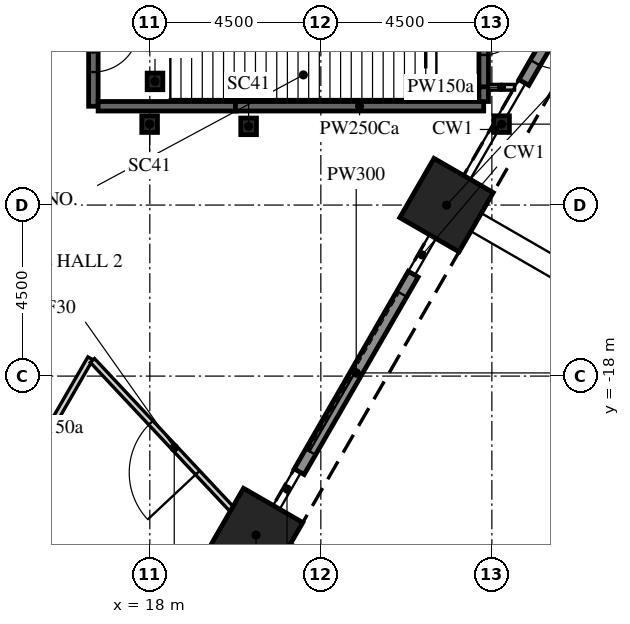
"""IFC4 building model, lengths in metres.
Left out: names, types, materials, properties, quantities, classifications, styles, units other than length and angle.
Written with IfcOpenShell. Run it as: python <this file> out.ifc"""

import sys

from ifc_helpers import new_model, si_unit, direction, frame, frame_2d, origin, origin_2d, place, context, subcontext, project, spatial, polyline, rectangle, i_section, outline, extrude, element, fill, save


model = new_model("IFC4")
c1 = context("Model", 3, precision=1e-05, world=origin(), true_north=direction((0.0, 1.0)))
c2 = subcontext(c1, "Body", "Model", "MODEL_VIEW")
j1 = project(units=[si_unit("LENGTHUNIT", "METRE"), si_unit("PLANEANGLEUNIT", "RADIAN")], contexts=[c1])
p1 = place(None, origin())
s1 = spatial("IfcSite", under=j1, at=p1, CompositionType="ELEMENT")
p2 = place(p1, origin())
s2 = spatial("IfcBuilding", under=s1, at=p2, CompositionType="ELEMENT")
p3 = place(p2, origin())
s3 = spatial("IfcBuildingStorey", under=s2, at=p3, CompositionType="ELEMENT", Elevation=0.0)
for number, where, z_axis, x_axis in (
    (1, (20.795, -22.182, -2.1), (0.0, 0.0, 1.0), (-0.5, -0.866, 0.0)),
    (2, (25.807, -13.501, -2.1), (0.0, 0.0, 1.0), (-0.5, -0.866, 0.0)),
):
    element("IfcColumn", number, at=place(p3, frame(where, z_axis=z_axis, x_axis=x_axis)), inside=s3, PredefinedType="COLUMN", context=c2, shape_type="SweptSolid", body=[
        extrude(rectangle(XDim=1.8, YDim=1.8, at=origin_2d()), origin(), (0.0, 0.0, 1.0), 10.85),
    ])
for number, where, z_axis, x_axis in (
    (3, (27.255, -11.37, -2.1), (0.0, 0.0, 1.0), (1.0, 0.0, 0.0)),
    (4, (20.599, -11.429, -2.1), (0.0, 0.0, 1.0), (1.0, 0.0, 0.0)),
    (5, (18.136, -10.246, -2.1), (0.0, 0.0, 1.0), (1.0, 0.0, 0.0)),
    (6, (17.995, -11.37, -2.1), (0.0, 0.0, 1.0), (1.0, 0.0, 0.0)),
):
    element("IfcColumn", number, at=place(p3, frame(where, z_axis=z_axis, x_axis=x_axis)), inside=s3, PredefinedType="COLUMN", context=c2, shape_type="SweptSolid", body=[
        extrude(i_section(OverallWidth=0.412, OverallDepth=0.437, WebThickness=0.036, FlangeThickness=0.058, FilletRadius=0.015, at=origin_2d()), origin(), (0.0, 0.0, 1.0), 10.85),
    ])
p4 = place(p3, frame((21.931, -20.515, 0.0), z_axis=(0.0, 0.0, 1.0), x_axis=(0.499990139034, 0.866031096941, 0.0)))
e7 = element("IfcWall", 7, at=p4, inside=s3, PredefinedType="SOLIDWALL", context=c2, shape_type="SweptSolid", body=[
    extrude(rectangle(XDim=6.0, YDim=0.3, at=frame_2d((3.0, 0.0))), origin(), (0.0, 0.0, 1.0), 7.823),
])
p5 = place(p4, frame((0.6, 0.0, 0.0)))
e8 = element("IfcOpeningElement", 8, at=p5, cuts=e7, PredefinedType="OPENING", context=c2, shape_type="SweptSolid", body=[
    extrude(rectangle(XDim=4.8, YDim=4.5, at=frame_2d((2.4, 2.25))), frame((0.0, 0.16, 0.0), z_axis=(0.0, -1.0, 0.0), x_axis=(1.0, 0.0, 0.0)), (0.0, 0.0, 1.0), 0.32),
])
p6 = place(p3, frame((29.043, -8.197, 0.0), z_axis=(0.0, 0.0, 1.0), x_axis=(-0.500001309137, -0.866024647952, 0.0)))
e9 = element("IfcWall", 9, at=p6, inside=s3, PredefinedType="SOLIDWALL", context=c2, shape_type="SweptSolid", body=[
    extrude(rectangle(XDim=2.4, YDim=0.3, at=frame_2d((1.2, 0.0))), origin(), (0.0, 0.0, 1.0), 7.823),
])
p7 = place(p6, frame((0.6, 0.0, 0.0)))
e10 = element("IfcOpeningElement", 10, at=p7, cuts=e9, PredefinedType="OPENING", context=c2, shape_type="SweptSolid", body=[
    extrude(rectangle(XDim=1.2, YDim=2.1, at=frame_2d((0.6, 1.05))), frame((0.0, 0.16, 0.0), z_axis=(0.0, -1.0, 0.0), x_axis=(1.0, 0.0, 0.0)), (0.0, 0.0, 1.0), 0.32),
])
p8 = place(p3, frame((7.91, -13.7, -2.1), z_axis=(0.0, 0.0, 1.0), x_axis=(0.499999880136, 0.866025472988, 0.0)))
e11 = element("IfcWall", 11, at=p8, inside=s3, PredefinedType="SHEAR", context=c2, shape_type="SweptSolid", body=[
    extrude(outline(polyline([(-0.173, -0.3), (15.993, -0.3), (15.646, 0.3), (0.173, 0.3), (-0.173, -0.3)])), origin(), (0.0, 0.0, 1.0), 10.85),
])
p9 = place(p8, frame((7.039, 0.0, 2.1)))
e12 = element("IfcOpeningElement", 12, at=p9, cuts=e11, PredefinedType="OPENING", context=c2, shape_type="SweptSolid", body=[
    extrude(rectangle(XDim=1.8, YDim=2.4, at=frame_2d((0.9, 1.2))), frame((0.0, 0.31, 0.0), z_axis=(0.0, -1.0, 0.0), x_axis=(1.0, 0.0, 0.0)), (0.0, 0.0, 1.0), 0.62),
])
p10 = place(p3, frame((14.313, -21.209, 0.0), z_axis=(0.0, 0.0, 1.0), x_axis=(0.500022752519, 0.866012267213, 0.0)))
e13 = element("IfcWall", 13, at=p10, inside=s3, PredefinedType="PARTITIONING", context=c2, shape_type="SweptSolid", body=[
    extrude(rectangle(XDim=4.246, YDim=0.15, at=frame_2d((2.123, 0.0))), origin(), (0.0, 0.0, 1.0), 8.75),
])
p11 = place(p3, frame((20.795, -22.182, 0.0), z_axis=(0.0, 0.0, 1.0), x_axis=(-0.683915327737, 0.729561391856, 0.0)))
e14 = element("IfcWall", 14, at=p11, inside=s3, PredefinedType="PARTITIONING", context=c2, shape_type="SweptSolid", body=[
    extrude(rectangle(XDim=6.295, YDim=0.15, at=frame_2d((3.147, 0.0))), origin(), (0.0, 0.0, 1.0), 8.75),
])
p12 = place(p11, frame((2.248, 0.0, 0.0)))
e15 = element("IfcOpeningElement", 15, at=p12, cuts=e14, PredefinedType="OPENING", context=c2, shape_type="SweptSolid", body=[
    extrude(rectangle(XDim=1.8, YDim=2.1, at=frame_2d((0.9, 1.05))), frame((0.0, 0.085, 0.0), z_axis=(0.0, -1.0, 0.0), x_axis=(1.0, 0.0, 0.0)), (0.0, 0.0, 1.0), 0.17),
])
p13 = place(p3, frame((16.515, -7.7, 0.0), z_axis=(0.0, 0.0, 1.0), x_axis=(0.0, -1.0, 0.0)))
e16 = element("IfcWall", 16, at=p13, inside=s3, PredefinedType="PARTITIONING", context=c2, shape_type="SweptSolid", body=[
    extrude(rectangle(XDim=3.2, YDim=0.25, at=frame_2d((1.6, 0.0))), origin(), (0.0, 0.0, 1.0), 8.75),
])
p14 = place(p13, frame((1.1, 0.0, 0.0)))
e17 = element("IfcOpeningElement", 17, at=p14, cuts=e16, PredefinedType="OPENING", context=c2, shape_type="SweptSolid", body=[
    extrude(rectangle(XDim=1.2, YDim=2.1, at=frame_2d((0.6, 1.05))), frame((0.0, 0.135, 0.0), z_axis=(0.0, -1.0, 0.0), x_axis=(1.0, 0.0, 0.0)), (0.0, 0.0, 1.0), 0.27),
])
p15 = place(p3, frame((17.225, -27.566, 0.0), z_axis=(0.0, 0.0, 1.0), x_axis=(-0.529909376743, 0.848054274466, 0.0)))
e18 = element("IfcWall", 18, at=p15, inside=s3, PredefinedType="PARTITIONING", context=c2, shape_type="SweptSolid", body=[
    extrude(rectangle(XDim=6.371, YDim=0.15, at=frame_2d((3.186, 0.0))), origin(), (0.0, 0.0, 1.0), 7.988),
])
p16 = place(p3, frame((20.275, -10.9, 0.0), z_axis=(0.0, 0.0, 1.0), x_axis=(-1.0, 0.0, 0.0)))
e19 = element("IfcWall", 19, at=p16, inside=s3, PredefinedType="PARTITIONING", context=c2, shape_type="SweptSolid", body=[
    extrude(rectangle(XDim=3.635, YDim=0.25, at=frame_2d((1.817, 0.0))), origin(), (0.0, 0.0, 1.0), 8.75),
])
p17 = place(p3, frame((26.785, -10.9, 0.0), z_axis=(0.0, 0.0, 1.0), x_axis=(-1.0, 0.0, 0.0)))
e20 = element("IfcWall", 20, at=p17, inside=s3, PredefinedType="PARTITIONING", context=c2, shape_type="SweptSolid", body=[
    extrude(rectangle(XDim=6.532, YDim=0.25, at=frame_2d((3.266, 0.0))), origin(), (0.0, 0.0, 1.0), 8.75),
])
p18 = place(p3, frame((26.785, -7.7, 0.0), z_axis=(0.0, 0.0, 1.0), x_axis=(0.0, -1.0, 0.0)))
e21 = element("IfcWall", 21, at=p18, inside=s3, PredefinedType="PARTITIONING", context=c2, shape_type="SweptSolid", body=[
    extrude(rectangle(XDim=2.7, YDim=0.25, at=frame_2d((1.35, 0.0))), origin(), (0.0, 0.0, 1.0), 8.75),
])
p19 = place(p18, frame((0.85, 0.0, 0.0)))
e22 = element("IfcOpeningElement", 22, at=p19, cuts=e21, PredefinedType="OPENING", context=c2, shape_type="SweptSolid", body=[
    extrude(rectangle(XDim=1.0, YDim=2.1, at=frame_2d((0.5, 1.05))), frame((0.0, 0.135, 0.0), z_axis=(0.0, -1.0, 0.0), x_axis=(1.0, 0.0, 0.0)), (0.0, 0.0, 1.0), 0.27),
])
p20 = place(p3, frame((26.785, -10.39, 0.0), z_axis=(0.0, 0.0, 1.0), x_axis=(0.0, -1.0, 0.0)))
e23 = element("IfcWall", 23, at=p20, inside=s3, PredefinedType="PARTITIONING", context=c2, shape_type="SweptSolid", body=[
    extrude(rectangle(XDim=0.385, YDim=0.25, at=frame_2d((0.192, 0.0))), origin(), (0.0, 0.0, 1.0), 8.75),
])
p21 = place(p3, frame((27.597, -10.4, 0.0), z_axis=(0.0, 0.0, 1.0), x_axis=(-1.0, 0.0, 0.0)))
e24 = element("IfcWall", 24, at=p21, inside=s3, PredefinedType="PARTITIONING", context=c2, shape_type="SweptSolid", body=[
    extrude(rectangle(XDim=0.687, YDim=0.15, at=frame_2d((0.344, 0.0))), origin(), (0.0, 0.0, 1.0), 8.75),
])
p22 = place(p5, frame((0.0, -0.025, 0.0)))
e25 = element("IfcDoor", 25, at=p22, inside=s3, OperationType="DOUBLE_DOOR_SLIDING", PredefinedType="DOOR", context=c2, shape_type="SweptSolid", body=[
    extrude(rectangle(XDim=4.8, YDim=4.5, at=frame_2d((2.4, 2.25))), frame((0.0, 0.025, 0.0), z_axis=(0.0, -1.0, 0.0), x_axis=(1.0, 0.0, 0.0)), (0.0, 0.0, 1.0), 0.05),
])
fill(e8, e25)
p23 = place(p7, frame((0.0, -0.025, 0.0)))
e26 = element("IfcDoor", 26, at=p23, inside=s3, OperationType="SINGLE_SWING_LEFT", PredefinedType="DOOR", context=c2, shape_type="SweptSolid", body=[
    extrude(rectangle(XDim=1.2, YDim=2.1, at=frame_2d((0.6, 1.05))), frame((0.0, 0.025, 0.0), z_axis=(0.0, -1.0, 0.0), x_axis=(1.0, 0.0, 0.0)), (0.0, 0.0, 1.0), 0.05),
])
fill(e10, e26)
p24 = place(p12, origin())
e27 = element("IfcDoor", 27, at=p24, inside=s3, OperationType="DOUBLE_DOOR_SINGLE_SWING", PredefinedType="DOOR", context=c2, shape_type="SweptSolid", body=[
    extrude(rectangle(XDim=1.8, YDim=2.1, at=frame_2d((0.9, 1.05))), frame((0.0, 0.025, 0.0), z_axis=(0.0, -1.0, 0.0), x_axis=(1.0, 0.0, 0.0)), (0.0, 0.0, 1.0), 0.05),
])
fill(e15, e27)
p25 = place(p14, origin())
e28 = element("IfcDoor", 28, at=p25, inside=s3, OperationType="SINGLE_SWING_LEFT", PredefinedType="DOOR", context=c2, shape_type="SweptSolid", body=[
    extrude(rectangle(XDim=1.2, YDim=2.1, at=frame_2d((0.6, 1.05))), frame((0.0, 0.025, 0.0), z_axis=(0.0, -1.0, 0.0), x_axis=(1.0, 0.0, 0.0)), (0.0, 0.0, 1.0), 0.05),
])
fill(e17, e28)
p26 = place(p19, origin())
e29 = element("IfcDoor", 29, at=p26, inside=s3, OperationType="SINGLE_SWING_LEFT", PredefinedType="DOOR", context=c2, shape_type="SweptSolid", body=[
    extrude(rectangle(XDim=1.0, YDim=2.1, at=frame_2d((0.5, 1.05))), frame((0.0, 0.025, 0.0), z_axis=(0.0, -1.0, 0.0), x_axis=(1.0, 0.0, 0.0)), (0.0, 0.0, 1.0), 0.05),
])
fill(e22, e29)
save(model, sys.argv[1])
